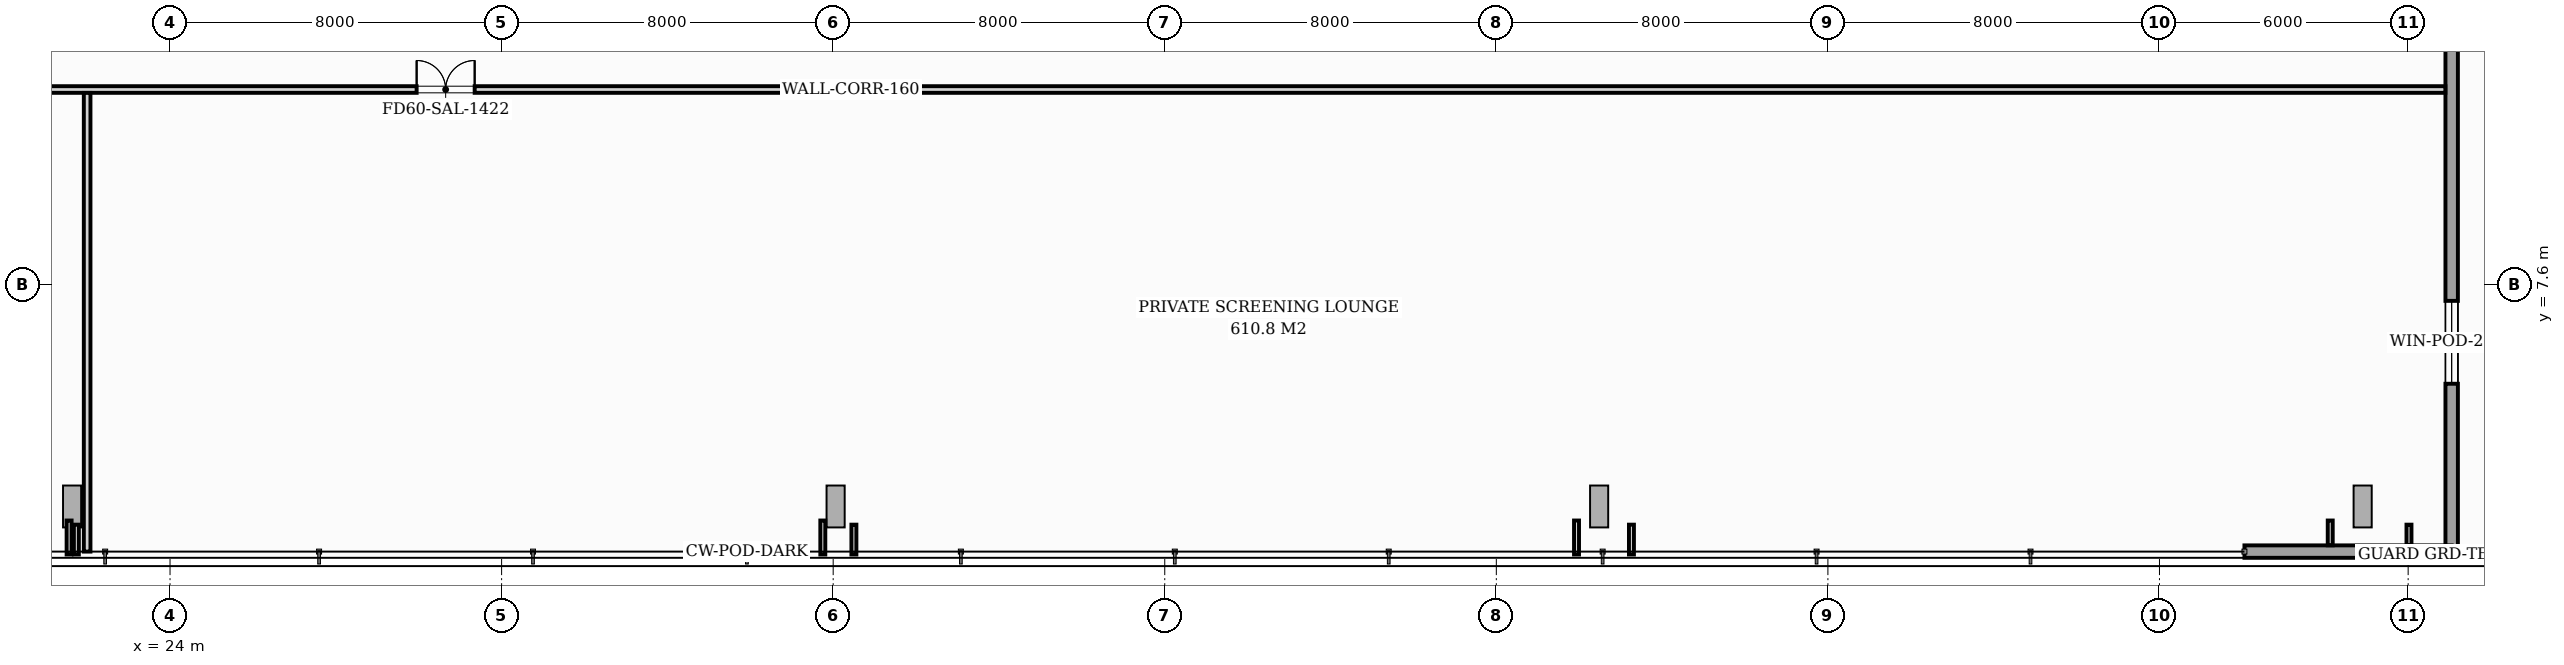
"""IFC4 building model, lengths in metres.
Left out: names, types, materials, properties, quantities, classifications, styles, units other than length and angle.
Written with IfcOpenShell. Run it as: python <this file> out.ifc"""

import sys

from ifc_helpers import new_model, si_unit, direction, frame, frame_2d, origin, origin_2d, place, context, subcontext, project, spatial, rectangle, i_section, extrude, source, transform, mapped, element, fill, save


model = new_model("IFC4")
c1 = context("Model", 3, precision=1e-05, world=origin(), true_north=direction((0.0, 1.0)))
c2 = subcontext(c1, "Body", "Model", "MODEL_VIEW")
j1 = project(units=[si_unit("LENGTHUNIT", "METRE"), si_unit("PLANEANGLEUNIT", "RADIAN")], contexts=[c1])
p1 = place(None, origin())
s1 = spatial("IfcSite", under=j1, at=p1, CompositionType="ELEMENT")
p2 = place(p1, origin())
s2 = spatial("IfcBuilding", under=s1, at=p2, CompositionType="ELEMENT")
p3 = place(p2, frame((0.0, 0.0, 5.0)))
s3 = spatial("IfcBuildingStorey", under=s2, at=p3, CompositionType="ELEMENT", Elevation=5.0)
m1 = source(origin(), c2, "Body", "SweptSolid", [
    extrude(i_section(OverallWidth=0.438, OverallDepth=1.011, WebThickness=0.041, FlangeThickness=0.074, FilletRadius=0.024, at=origin_2d()), origin(), (0.0, 0.0, 1.0), 4.032),
])
p4 = place(p3, frame((21.737, 2.182, 0.033), z_axis=(-0.085366370454, 0.048798081266, 0.995153922798), x_axis=(0.863960144879, -0.493866579271, 0.098329395095)))
e1 = element("IfcColumn", 1, at=p4, inside=s3, PredefinedType="COLUMN", context=c2, shape_type="MappedRepresentation", body=[
    mapped(m1, transform((0.0, 0.0, 0.0), scale=1.0)),
])
m2 = source(origin(), c2, "Body", "SweptSolid", [
    extrude(i_section(OverallWidth=0.438, OverallDepth=1.011, WebThickness=0.041, FlangeThickness=0.074, FilletRadius=0.024, at=origin_2d()), origin(), (0.0, 0.0, 1.0), 4.164),
])
p5 = place(p3, frame((40.468, 2.184, 0.088), z_axis=(-0.344646940033, 0.045968560903, 0.937606195657), x_axis=(0.92937589654, -0.123958949113, 0.347699039207)))
e2 = element("IfcColumn", 2, at=p5, inside=s3, PredefinedType="COLUMN", context=c2, shape_type="MappedRepresentation", body=[
    mapped(m2, transform((0.0, 0.0, 0.0), scale=1.0)),
])
m3 = source(origin(), c2, "Body", "SweptSolid", [
    extrude(i_section(OverallWidth=0.438, OverallDepth=1.011, WebThickness=0.041, FlangeThickness=0.074, FilletRadius=0.024, at=origin_2d()), origin(), (0.0, 0.0, 1.0), 4.556),
])
p6 = place(p3, frame((59.175, 2.186, 0.131), z_axis=(-0.544273429508, 0.041104541201, 0.837900262934), x_axis=(0.835520932565, -0.06310009406, 0.545823368294)))
e3 = element("IfcColumn", 3, at=p6, inside=s3, PredefinedType="COLUMN", context=c2, shape_type="MappedRepresentation", body=[
    mapped(m3, transform((0.0, 0.0, 0.0), scale=1.0)),
])
m4 = source(origin(), c2, "Body", "SweptSolid", [
    extrude(i_section(OverallWidth=0.438, OverallDepth=1.011, WebThickness=0.041, FlangeThickness=0.074, FilletRadius=0.024, at=origin_2d()), origin(), (0.0, 0.0, 1.0), 5.138),
])
p7 = place(p3, frame((77.87, 2.188, 0.161), z_axis=(-0.681119746159, 0.035825900844, 0.731295013124), x_axis=(0.730285504781, -0.038411947723, 0.682061290339)))
e4 = element("IfcColumn", 4, at=p7, inside=s3, PredefinedType="COLUMN", context=c2, shape_type="MappedRepresentation", body=[
    mapped(m4, transform((0.0, 0.0, 0.0), scale=1.0)),
])
p8 = place(p3, frame((79.05, 35.45, 0.0), z_axis=(0.0, 0.0, 1.0), x_axis=(0.0, -1.0, 0.0)))
e5 = element("IfcWall", 5, at=p8, inside=s3, PredefinedType="STANDARD", context=c2, shape_type="SweptSolid", body=[
    extrude(rectangle(XDim=34.3, YDim=0.3, at=frame_2d((17.15, 0.0))), origin(), (0.0, 0.0, 1.0), 4.08),
])
p9 = place(p8, frame((10.45, 0.0, 0.0)))
e6 = element("IfcOpeningElement", 6, at=p9, cuts=e5, PredefinedType="OPENING", context=c2, shape_type="SweptSolid", body=[
    extrude(rectangle(XDim=1.6, YDim=2.1, at=frame_2d((0.8, 1.05))), frame((0.0, 0.16, 0.0), z_axis=(0.0, -1.0, 0.0), x_axis=(1.0, 0.0, 0.0)), (0.0, 0.0, 1.0), 0.32),
])
p10 = place(p8, frame((28.25, 0.0, 0.9)))
e7 = element("IfcOpeningElement", 7, at=p10, cuts=e5, PredefinedType="OPENING", context=c2, shape_type="SweptSolid", body=[
    extrude(rectangle(XDim=2.0, YDim=2.4, at=frame_2d((1.0, 1.2))), frame((0.0, 0.16, 0.0), z_axis=(0.0, -1.0, 0.0), x_axis=(1.0, 0.0, 0.0)), (0.0, 0.0, 1.0), 0.32),
])
p11 = place(p3, frame((79.05, 1.15, 0.0), z_axis=(0.0, 0.0, 1.0), x_axis=(-1.0, 0.0, 0.0)))
e8 = element("IfcWall", 8, at=p11, inside=s3, PredefinedType="STANDARD", context=c2, shape_type="SweptSolid", body=[
    extrude(rectangle(XDim=5.0, YDim=0.3, at=frame_2d((2.5, 0.0))), origin(), (0.0, 0.0, 1.0), 4.08),
])
p12 = place(p3, frame((1.95, 12.3, 0.0), z_axis=(0.0, 0.0, 1.0), x_axis=(1.0, 0.0, 0.0)))
e9 = element("IfcWall", 9, at=p12, inside=s3, PredefinedType="PARTITIONING", context=c2, shape_type="SweptSolid", body=[
    extrude(rectangle(XDim=76.948, YDim=0.16, at=frame_2d((38.474, 0.0))), origin(), (0.0, 0.0, 1.0), 4.08),
])
p13 = place(p12, frame((6.5, 0.0, 0.0)))
e10 = element("IfcOpeningElement", 10, at=p13, cuts=e9, PredefinedType="OPENING", context=c2, shape_type="SweptSolid", body=[
    extrude(rectangle(XDim=1.4, YDim=2.08, at=frame_2d((0.7, 1.04))), frame((0.0, 0.09, 0.0), z_axis=(0.0, -1.0, 0.0), x_axis=(1.0, 0.0, 0.0)), (0.0, 0.0, 1.0), 0.18),
])
p14 = place(p12, frame((28.0, 0.0, 0.0)))
e11 = element("IfcOpeningElement", 11, at=p14, cuts=e9, PredefinedType="OPENING", context=c2, shape_type="SweptSolid", body=[
    extrude(rectangle(XDim=1.4, YDim=2.08, at=frame_2d((0.7, 1.04))), frame((0.0, 0.09, 0.0), z_axis=(0.0, -1.0, 0.0), x_axis=(1.0, 0.0, 0.0)), (0.0, 0.0, 1.0), 0.18),
])
p15 = place(p3, frame((22.0, 1.15, 0.0), z_axis=(0.0, 0.0, 1.0), x_axis=(0.0, 1.0, 0.0)))
e12 = element("IfcWall", 12, at=p15, inside=s3, PredefinedType="PARTITIONING", context=c2, shape_type="SweptSolid", body=[
    extrude(rectangle(XDim=11.068, YDim=0.16, at=frame_2d((5.534, 0.0))), origin(), (0.0, 0.0, 1.0), 4.08),
])
for number, where, z_axis, x_axis in (
    (13, (21.565, 1.9, 0.0), (0.0, 0.0, 1.0), (0.0, -1.0, 0.0)),
    (14, (39.75, 1.9, 0.0), (0.0, 0.0, 1.0), (0.0, -1.0, 0.0)),
    (15, (57.935, 1.9, 0.0), (0.0, 0.0, 1.0), (0.0, -1.0, 0.0)),
):
    element("IfcWall", number, at=place(p3, frame(where, z_axis=z_axis, x_axis=x_axis)), inside=s3, PredefinedType="PARTITIONING", context=c2, shape_type="SweptSolid", body=[
        extrude(rectangle(XDim=0.82, YDim=0.12, at=frame_2d((0.41, 0.0))), origin(), (0.0, 0.0, 1.0), 4.08),
    ])
p16 = place(p3, frame((76.12, 1.9, 0.0), z_axis=(0.0, 0.0, 1.0), x_axis=(0.0, -1.0, 0.0)))
e16 = element("IfcWall", 16, at=p16, inside=s3, PredefinedType="PARTITIONING", context=c2, shape_type="SweptSolid", body=[
    extrude(rectangle(XDim=0.598, YDim=0.12, at=frame_2d((0.299, 0.0))), origin(), (0.0, 0.0, 1.0), 4.08),
])
for number, where, z_axis, x_axis in (
    (17, (21.74, 1.8, 0.0), (0.0, 0.0, 1.0), (0.0, -1.0, 0.0)),
    (18, (40.5, 1.8, 0.0), (0.0, 0.0, 1.0), (0.0, -1.0, 0.0)),
    (19, (59.26, 1.8, 0.0), (0.0, 0.0, 1.0), (0.0, -1.0, 0.0)),
):
    element("IfcWall", number, at=place(p3, frame(where, z_axis=z_axis, x_axis=x_axis)), inside=s3, PredefinedType="PARTITIONING", context=c2, shape_type="SweptSolid", body=[
        extrude(rectangle(XDim=0.72, YDim=0.12, at=frame_2d((0.36, 0.0))), origin(), (0.0, 0.0, 1.0), 4.08),
    ])
p17 = place(p3, frame((78.02, 1.8, 0.0), z_axis=(0.0, 0.0, 1.0), x_axis=(0.0, -1.0, 0.0)))
e20 = element("IfcWall", 20, at=p17, inside=s3, PredefinedType="PARTITIONING", context=c2, shape_type="SweptSolid", body=[
    extrude(rectangle(XDim=0.498, YDim=0.12, at=frame_2d((0.249, 0.0))), origin(), (0.0, 0.0, 1.0), 4.08),
])
m5 = source(origin(), c2, "Body", "SweptSolid", [
    extrude(rectangle(XDim=2.0, YDim=2.4, at=frame_2d((1.0, 1.2))), frame((0.0, 0.03, 0.0), z_axis=(0.0, -1.0, 0.0), x_axis=(1.0, 0.0, 0.0)), (0.0, 0.0, 1.0), 0.06),
])
p18 = place(p10, origin())
e21 = element("IfcWindow", 21, at=p18, inside=s3, PartitioningType="SINGLE_PANEL", PredefinedType="WINDOW", context=c2, shape_type="MappedRepresentation", body=[
    mapped(m5, transform((0.0, 0.0, 0.0), scale=1.0)),
])
fill(e7, e21)
m6 = source(origin(), c2, "Body", "SweptSolid", [
    extrude(rectangle(XDim=1.4, YDim=2.08, at=frame_2d((0.7, 1.04))), frame((0.0, 0.025, 0.0), z_axis=(0.0, -1.0, 0.0), x_axis=(1.0, 0.0, 0.0)), (0.0, 0.0, 1.0), 0.05),
])
p19 = place(p14, origin())
e22 = element("IfcDoor", 22, at=p19, inside=s3, OperationType="DOUBLE_DOOR_SINGLE_SWING", PredefinedType="DOOR", context=c2, shape_type="MappedRepresentation", body=[
    mapped(m6, transform((0.0, 0.0, 0.0), scale=1.0)),
])
fill(e11, e22)
save(model, sys.argv[1])
